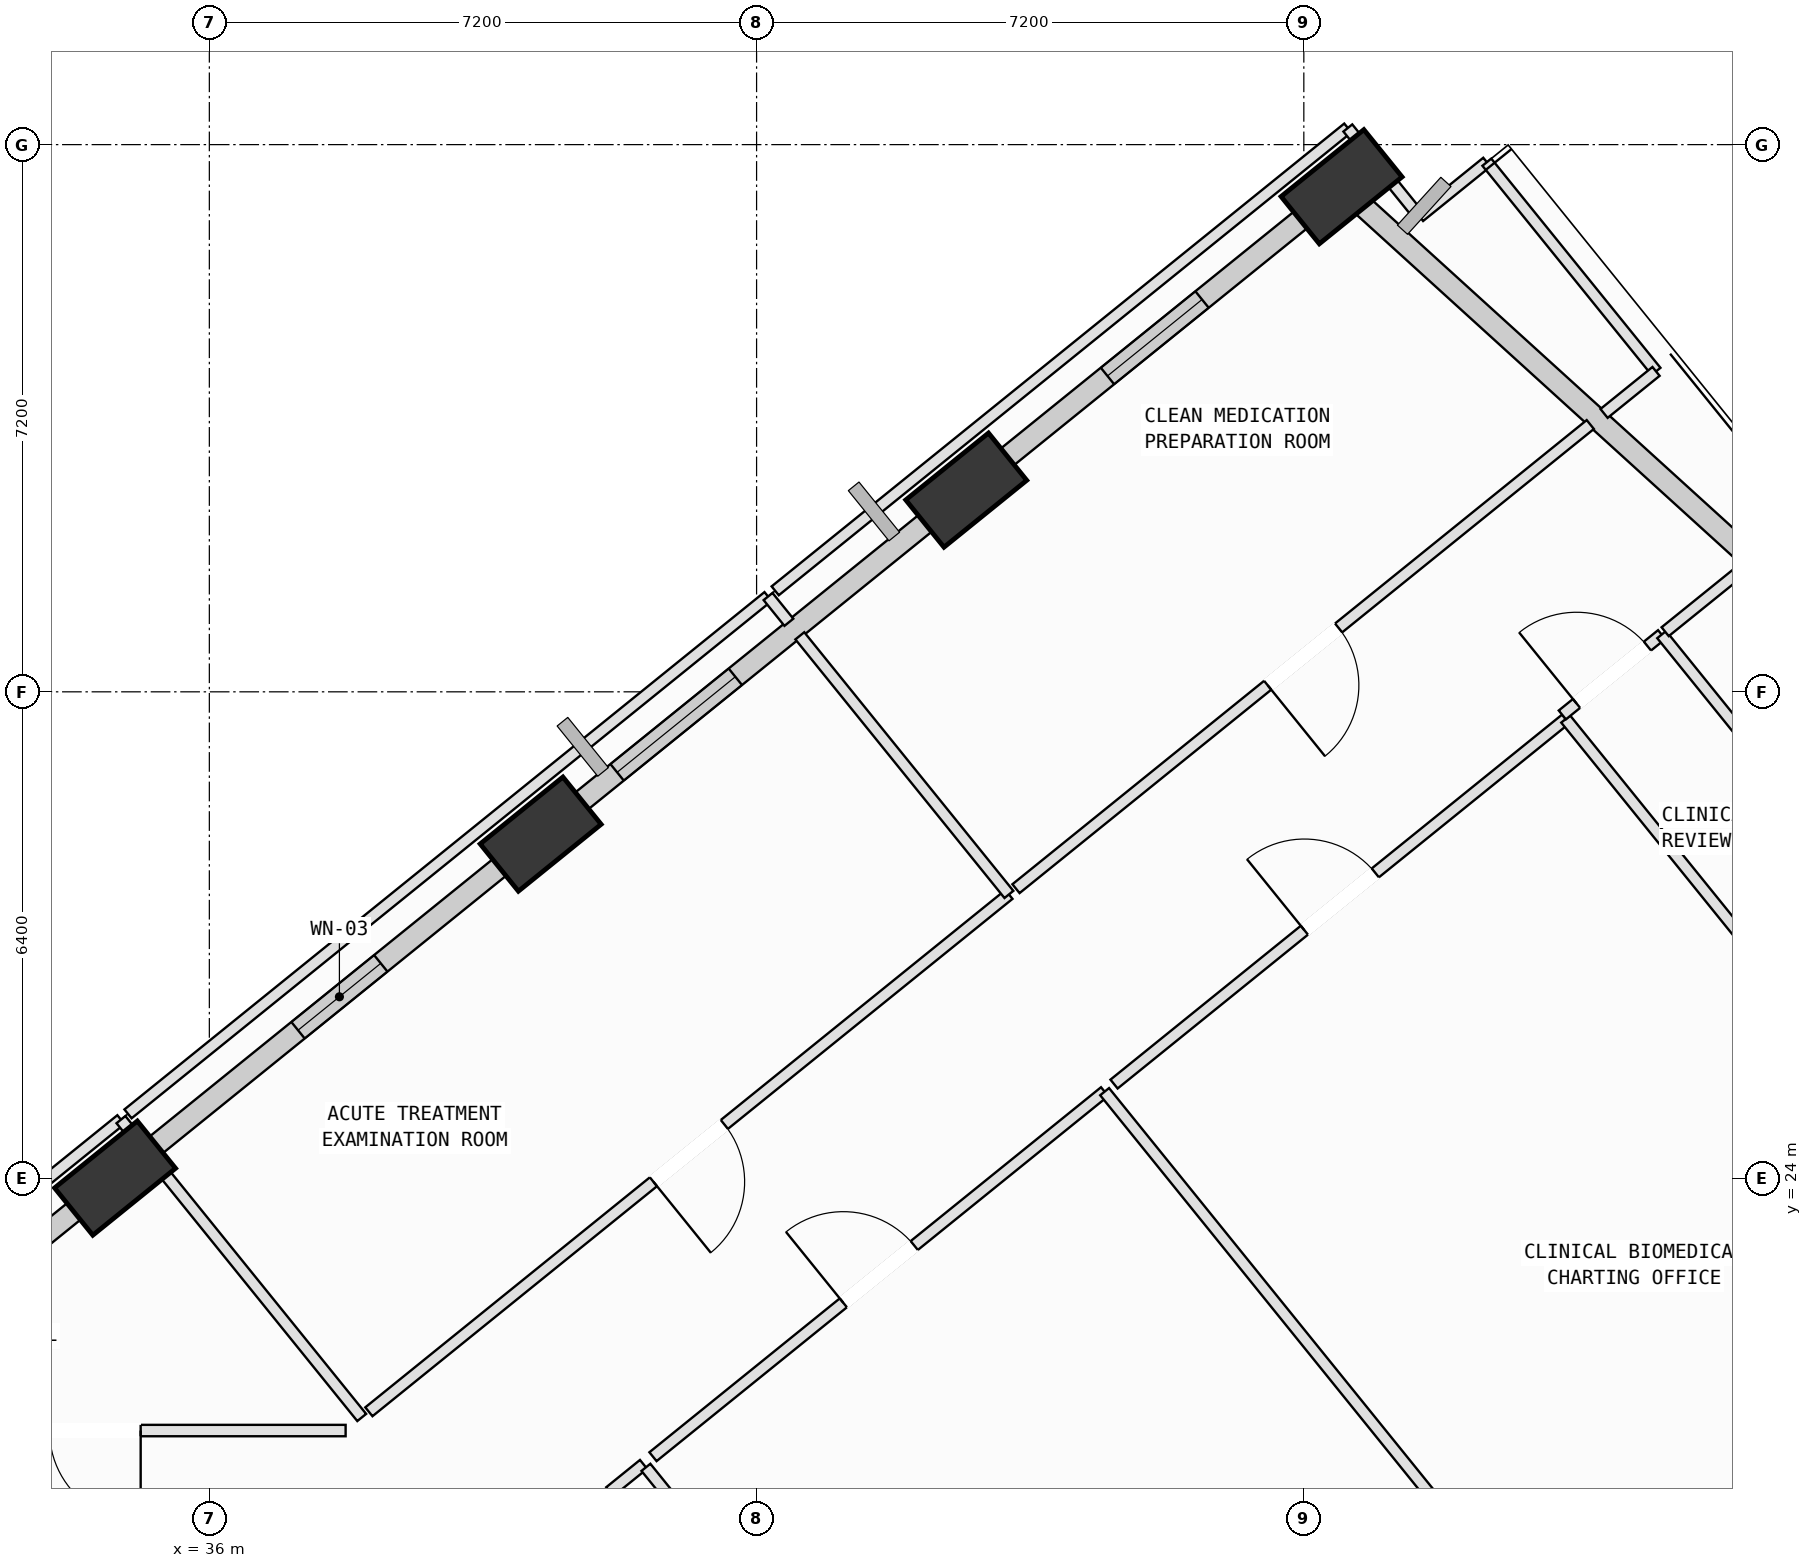
"""IFC4 building model, lengths in metres.
Left out: names, types, materials, properties, quantities, classifications, styles, units other than length and angle.
Written with IfcOpenShell. Run it as: python <this file> out.ifc"""

import sys

from ifc_helpers import new_model, si_unit, direction, frame, frame_2d, origin, origin_2d, place, context, subcontext, project, spatial, rectangle, extrude, element, fill, save


model = new_model("IFC4")
c1 = context("Model", 3, precision=1e-05, world=origin(), true_north=direction((0.0, 1.0)))
c2 = subcontext(c1, "Body", "Model", "MODEL_VIEW")
j1 = project(units=[si_unit("LENGTHUNIT", "METRE"), si_unit("PLANEANGLEUNIT", "RADIAN")], contexts=[c1])
p1 = place(None, origin())
s1 = spatial("IfcSite", under=j1, at=p1, CompositionType="ELEMENT")
p2 = place(p1, origin())
s2 = spatial("IfcBuilding", under=s1, at=p2, CompositionType="ELEMENT")
p3 = place(p2, frame((0.0, 0.0, 189.8)))
s3 = spatial("IfcBuildingStorey", under=s2, at=p3, CompositionType="ELEMENT", Elevation=189.8)
p4 = place(p3, frame((50.897, 37.046, 0.002), z_axis=(-0.051119669186, 0.071019826119, 0.996164124891), x_axis=(-0.265346985854, -0.96258245747, 0.055008996258)))
e1 = element("IfcColumn", 1, at=p4, inside=s3, PredefinedType="COLUMN", context=c2, shape_type="SweptSolid", body=[
    extrude(rectangle(XDim=1.4, YDim=0.8, at=origin_2d()), origin(), (0.0, 0.0, 1.0), 4.012),
])
p5 = place(p3, frame((45.958, 33.054, 0.002), z_axis=(-0.034573200361, 0.050792726456, 0.998110611483), x_axis=(-0.289833245681, -0.956297423836, 0.038625469103)))
e2 = element("IfcColumn", 2, at=p5, inside=s3, PredefinedType="COLUMN", context=c2, shape_type="SweptSolid", body=[
    extrude(rectangle(XDim=1.4, YDim=0.8, at=origin_2d()), origin(), (0.0, 0.0, 1.0), 4.004),
])
p6 = place(p3, frame((40.359, 28.528, 0.002), z_axis=(-0.015692361565, 0.02790431609, 0.999487418096), x_axis=(-0.369875503561, -0.928863327124, 0.02012539166)))
e3 = element("IfcColumn", 3, at=p6, inside=s3, PredefinedType="COLUMN", context=c2, shape_type="SweptSolid", body=[
    extrude(rectangle(XDim=1.4, YDim=0.8, at=origin_2d()), origin(), (0.0, 0.0, 1.0), 3.998),
])
p7 = place(p3, frame((34.76, 24.001, 0.002), z_axis=(0.003237771962, 0.004887202961, 0.999982815892), x_axis=(-0.995513971881, -0.094542846934, 0.003685360637)))
e4 = element("IfcColumn", 4, at=p7, inside=s3, PredefinedType="COLUMN", context=c2, shape_type="SweptSolid", body=[
    extrude(rectangle(XDim=1.4, YDim=0.8, at=origin_2d()), origin(), (0.0, 0.0, 1.0), 3.996),
])
p8 = place(p3, frame((51.136, 36.829, 0.0), z_axis=(0.0, 0.0, 1.0), x_axis=(0.740111301714, -0.672484394671, 0.0)))
e5 = element("IfcWall", 5, at=p8, inside=s3, PredefinedType="SOLIDWALL", context=c2, shape_type="SweptSolid", body=[
    extrude(rectangle(XDim=8.838, YDim=0.28, at=frame_2d((4.419, 0.0))), origin(), (0.0, 0.0, 1.0), 3.265),
])
p9 = place(p3, frame((46.34, 33.363, 0.0), z_axis=(0.0, 0.0, 1.0), x_axis=(0.777703327774, 0.628631477074, 0.0)))
e6 = element("IfcWall", 6, at=p9, inside=s3, PredefinedType="SOLIDWALL", context=c2, shape_type="SweptSolid", body=[
    extrude(rectangle(XDim=5.405, YDim=0.28, at=frame_2d((2.702, 0.0))), origin(), (0.0, 0.0, 1.0), 3.265),
])
p10 = place(p9, frame((1.898, 0.0, 0.75)))
e7 = element("IfcOpeningElement", 7, at=p10, cuts=e6, PredefinedType="OPENING", context=c2, shape_type="SweptSolid", body=[
    extrude(rectangle(XDim=1.6, YDim=1.95, at=frame_2d((0.8, 0.975))), frame((0.0, 0.15, 0.0), z_axis=(0.0, -1.0, 0.0), x_axis=(1.0, 0.0, 0.0)), (0.0, 0.0, 1.0), 0.3),
])
p11 = place(p3, frame((40.75, 28.844, 0.0), z_axis=(0.0, 0.0, 1.0), x_axis=(0.777687534284, 0.628651015286, 0.0)))
e8 = element("IfcWall", 8, at=p11, inside=s3, PredefinedType="SOLIDWALL", context=c2, shape_type="SweptSolid", body=[
    extrude(rectangle(XDim=6.227, YDim=0.28, at=frame_2d((3.113, 0.0))), origin(), (0.0, 0.0, 1.0), 3.065),
])
p12 = place(p11, frame((0.791, 0.0, 0.75)))
e9 = element("IfcOpeningElement", 9, at=p12, cuts=e8, PredefinedType="OPENING", context=c2, shape_type="SweptSolid", body=[
    extrude(rectangle(XDim=2.0, YDim=1.95, at=frame_2d((1.0, 0.975))), frame((0.0, 0.15, 0.0), z_axis=(0.0, -1.0, 0.0), x_axis=(1.0, 0.0, 0.0)), (0.0, 0.0, 1.0), 0.3),
])
p13 = place(p3, frame((35.154, 24.321, 0.0), z_axis=(0.0, 0.0, 1.0), x_axis=(0.7776950364, 0.628641734503, 0.0)))
e10 = element("IfcWall", 10, at=p13, inside=s3, PredefinedType="SOLIDWALL", context=c2, shape_type="SweptSolid", body=[
    extrude(rectangle(XDim=6.211, YDim=0.28, at=frame_2d((3.105, 0.0))), origin(), (0.0, 0.0, 1.0), 3.265),
])
p14 = place(p13, frame((2.588, 0.0, 0.75)))
e11 = element("IfcOpeningElement", 11, at=p14, cuts=e10, PredefinedType="OPENING", context=c2, shape_type="SweptSolid", body=[
    extrude(rectangle(XDim=1.4, YDim=1.85, at=frame_2d((0.7, 0.925))), frame((0.0, 0.15, 0.0), z_axis=(0.0, -1.0, 0.0), x_axis=(1.0, 0.0, 0.0)), (0.0, 0.0, 1.0), 0.3),
])
p15 = place(p3, frame((29.747, 19.95, 0.0), z_axis=(0.0, 0.0, 1.0), x_axis=(0.777717798176, 0.628613574782, 0.0)))
e12 = element("IfcWall", 12, at=p15, inside=s3, PredefinedType="SOLIDWALL", context=c2, shape_type="SweptSolid", body=[
    extrude(rectangle(XDim=5.96, YDim=0.28, at=frame_2d((2.98, 0.0))), origin(), (0.0, 0.0, 1.0), 3.265),
])
p16 = place(p3, frame((41.269, 19.876, 0.0), z_axis=(0.0, 0.0, 1.0), x_axis=(0.777394219276, 0.629013694475, 0.0)))
e13 = element("IfcWall", 13, at=p16, inside=s3, PredefinedType="PARTITIONING", context=c2, shape_type="SweptSolid", body=[
    extrude(rectangle(XDim=0.571, YDim=0.15, at=frame_2d((0.286, 0.0))), origin(), (0.0, 0.0, 1.0), 3.065),
])
p17 = place(p3, frame((41.744, 20.196, 0.0), z_axis=(0.0, 0.0, 1.0), x_axis=(0.628664865479, -0.777676338146, 0.0)))
e14 = element("IfcWall", 14, at=p17, inside=s3, PredefinedType="PARTITIONING", context=c2, shape_type="SweptSolid", body=[
    extrude(rectangle(XDim=13.435, YDim=0.15, at=frame_2d((6.717, 0.0))), origin(), (0.0, 0.0, 1.0), 3.78),
])
p18 = place(p3, frame((41.837, 20.336, 0.0), z_axis=(0.0, 0.0, 1.0), x_axis=(0.777713450533, 0.628618953628, 0.0)))
e15 = element("IfcWall", 15, at=p18, inside=s3, PredefinedType="PARTITIONING", context=c2, shape_type="SweptSolid", body=[
    extrude(rectangle(XDim=7.641, YDim=0.15, at=frame_2d((3.82, 0.0))), origin(), (0.0, 0.0, 1.0), 3.065),
])
p19 = place(p18, frame((3.22, 0.0, 0.0)))
e16 = element("IfcOpeningElement", 16, at=p19, cuts=e15, PredefinedType="OPENING", context=c2, shape_type="SweptSolid", body=[
    extrude(rectangle(XDim=1.2, YDim=2.15, at=frame_2d((0.6, 1.075))), frame((0.0, 0.085, 0.0), z_axis=(0.0, -1.0, 0.0), x_axis=(1.0, 0.0, 0.0)), (0.0, 0.0, 1.0), 0.17),
])
p20 = place(p3, frame((47.779, 25.139, 0.0), z_axis=(0.0, 0.0, 1.0), x_axis=(0.628603815075, -0.777725686649, 0.0)))
e17 = element("IfcWall", 17, at=p20, inside=s3, PredefinedType="PARTITIONING", context=c2, shape_type="SweptSolid", body=[
    extrude(rectangle(XDim=13.486, YDim=0.15, at=frame_2d((6.743, 0.0))), origin(), (0.0, 0.0, 1.0), 3.78),
])
p21 = place(p3, frame((47.903, 25.239, 0.0), z_axis=(0.0, 0.0, 1.0), x_axis=(0.777700823306, 0.628634575433, 0.0)))
e18 = element("IfcWall", 18, at=p21, inside=s3, PredefinedType="PARTITIONING", context=c2, shape_type="SweptSolid", body=[
    extrude(rectangle(XDim=7.64, YDim=0.15, at=frame_2d((3.82, 0.0))), origin(), (0.0, 0.0, 1.0), 3.78),
])
p22 = place(p21, frame((3.22, 0.0, 0.0)))
e19 = element("IfcOpeningElement", 19, at=p22, cuts=e18, PredefinedType="OPENING", context=c2, shape_type="SweptSolid", body=[
    extrude(rectangle(XDim=1.2, YDim=2.15, at=frame_2d((0.6, 1.075))), frame((0.0, 0.085, 0.0), z_axis=(0.0, -1.0, 0.0), x_axis=(1.0, 0.0, 0.0)), (0.0, 0.0, 1.0), 0.17),
])
p23 = place(p3, frame((53.845, 30.042, 0.0), z_axis=(0.0, 0.0, 1.0), x_axis=(0.628663319938, -0.777677587541, 0.0)))
e20 = element("IfcWall", 20, at=p23, inside=s3, PredefinedType="PARTITIONING", context=c2, shape_type="SweptSolid", body=[
    extrude(rectangle(XDim=13.83, YDim=0.15, at=frame_2d((6.915, 0.0))), origin(), (0.0, 0.0, 1.0), 3.78),
])
p24 = place(p3, frame((29.437, 20.406, 0.0), z_axis=(0.0, 0.0, 1.0), x_axis=(0.777692568026, 0.628644788125, 0.0)))
e21 = element("IfcWall", 21, at=p24, inside=s3, PredefinedType="PARTITIONING", context=c2, shape_type="SweptSolid", body=[
    extrude(rectangle(XDim=6.944, YDim=0.15, at=frame_2d((3.472, 0.0))), origin(), (0.0, 0.0, 1.0), 3.78),
])
p25 = place(p3, frame((34.837, 24.771, 0.0), z_axis=(0.0, 0.0, 1.0), x_axis=(0.628729378475, -0.777624182136, 0.0)))
e22 = element("IfcWall", 22, at=p25, inside=s3, PredefinedType="PARTITIONING", context=c2, shape_type="SweptSolid", body=[
    extrude(rectangle(XDim=0.435, YDim=0.15, at=frame_2d((0.217, 0.0))), origin(), (0.0, 0.0, 1.0), 3.78),
])
p26 = place(p3, frame((35.255, 24.254, 0.0), z_axis=(0.0, 0.0, 1.0), x_axis=(0.628661828858, -0.777678792907, 0.0)))
e23 = element("IfcWall", 23, at=p26, inside=s3, PredefinedType="PARTITIONING", context=c2, shape_type="SweptSolid", body=[
    extrude(rectangle(XDim=4.374, YDim=0.15, at=frame_2d((2.187, 0.0))), origin(), (0.0, 0.0, 1.0), 3.78),
])
p27 = place(p3, frame((37.793, 20.68, 0.0), z_axis=(0.0, 0.0, 1.0), x_axis=(-1.0, 0.0, 0.0)))
e24 = element("IfcWall", 24, at=p27, inside=s3, PredefinedType="PARTITIONING", context=c2, shape_type="SweptSolid", body=[
    extrude(rectangle(XDim=6.593, YDim=0.15, at=frame_2d((3.296, 0.0))), origin(), (0.0, 0.0, 1.0), 3.415),
])
p28 = place(p27, frame((2.697, 0.0, 0.0)))
e25 = element("IfcOpeningElement", 25, at=p28, cuts=e24, PredefinedType="OPENING", context=c2, shape_type="SweptSolid", body=[
    extrude(rectangle(XDim=1.2, YDim=2.15, at=frame_2d((0.6, 1.075))), frame((0.0, 0.085, 0.0), z_axis=(0.0, -1.0, 0.0), x_axis=(1.0, 0.0, 0.0)), (0.0, 0.0, 1.0), 0.17),
])
p29 = place(p3, frame((46.52, 27.734, 0.0), z_axis=(0.0, 0.0, 1.0), x_axis=(-0.777697805965, -0.628638308248, 0.0)))
e26 = element("IfcWall", 26, at=p29, inside=s3, PredefinedType="PARTITIONING", context=c2, shape_type="SweptSolid", body=[
    extrude(rectangle(XDim=10.828, YDim=0.15, at=frame_2d((5.414, 0.0))), origin(), (0.0, 0.0, 1.0), 3.065),
])
p30 = place(p29, frame((4.814, 0.0, 0.0)))
e27 = element("IfcOpeningElement", 27, at=p30, cuts=e26, PredefinedType="OPENING", context=c2, shape_type="SweptSolid", body=[
    extrude(rectangle(XDim=1.2, YDim=2.15, at=frame_2d((0.6, 1.075))), frame((0.0, 0.085, 0.0), z_axis=(0.0, -1.0, 0.0), x_axis=(1.0, 0.0, 0.0)), (0.0, 0.0, 1.0), 0.17),
])
p31 = place(p3, frame((34.93, 24.847, 0.0), z_axis=(0.0, 0.0, 1.0), x_axis=(0.777695693254, 0.628640921906, 0.0)))
e28 = element("IfcWall", 28, at=p31, inside=s3, PredefinedType="PARTITIONING", context=c2, shape_type="SweptSolid", body=[
    extrude(rectangle(XDim=10.828, YDim=0.15, at=frame_2d((5.414, 0.0))), origin(), (0.0, 0.0, 1.0), 3.265),
])
p32 = place(p3, frame((43.351, 31.654, 0.0), z_axis=(0.0, 0.0, 1.0), x_axis=(0.628376214537, -0.777909591793, 0.0)))
e29 = element("IfcWall", 29, at=p32, inside=s3, PredefinedType="PARTITIONING", context=c2, shape_type="SweptSolid", body=[
    extrude(rectangle(XDim=0.436, YDim=0.15, at=frame_2d((0.218, 0.0))), origin(), (0.0, 0.0, 1.0), 3.78),
])
p33 = place(p3, frame((43.769, 31.137, 0.0), z_axis=(0.0, 0.0, 1.0), x_axis=(0.62866041467, -0.777679936109, 0.0)))
e30 = element("IfcWall", 30, at=p33, inside=s3, PredefinedType="PARTITIONING", context=c2, shape_type="SweptSolid", body=[
    extrude(rectangle(XDim=4.376, YDim=0.15, at=frame_2d((2.188, 0.0))), origin(), (0.0, 0.0, 1.0), 3.78),
])
p34 = place(p3, frame((51.922, 36.653, 0.0), z_axis=(0.0, 0.0, 1.0), x_axis=(0.777848488331, 0.62845185114, 0.0)))
e31 = element("IfcWall", 31, at=p34, inside=s3, PredefinedType="PARTITIONING", context=c2, shape_type="SweptSolid", body=[
    extrude(rectangle(XDim=1.139, YDim=0.15, at=frame_2d((0.569, 0.0))), origin(), (0.0, 0.0, 1.0), 3.78),
])
p35 = place(p3, frame((52.808, 37.369, 0.0), z_axis=(0.0, 0.0, 1.0), x_axis=(0.628731909496, -0.777622135733, 0.0)))
e32 = element("IfcWall", 32, at=p35, inside=s3, PredefinedType="PARTITIONING", context=c2, shape_type="SweptSolid", body=[
    extrude(rectangle(XDim=3.54, YDim=0.15, at=frame_2d((1.77, 0.0))), origin(), (0.0, 0.0, 1.0), 3.78),
])
p36 = place(p3, frame((55.034, 34.616, 0.0), z_axis=(0.0, 0.0, 1.0), x_axis=(-0.777580932049, -0.628782867223, 0.0)))
e33 = element("IfcWall", 33, at=p36, inside=s3, PredefinedType="PARTITIONING", context=c2, shape_type="SweptSolid", body=[
    extrude(rectangle(XDim=0.879, YDim=0.15, at=frame_2d((0.44, 0.0))), origin(), (0.0, 0.0, 1.0), 3.78),
])
p37 = place(p3, frame((54.169, 33.917, 0.0), z_axis=(0.0, 0.0, 1.0), x_axis=(-0.777735624906, -0.628591518995, 0.0)))
e34 = element("IfcWall", 34, at=p37, inside=s3, PredefinedType="PARTITIONING", context=c2, shape_type="SweptSolid", body=[
    extrude(rectangle(XDim=9.715, YDim=0.15, at=frame_2d((4.858, 0.0))), origin(), (0.0, 0.0, 1.0), 3.78),
])
p38 = place(p37, frame((4.258, 0.0, 0.0)))
e35 = element("IfcOpeningElement", 35, at=p38, cuts=e34, PredefinedType="OPENING", context=c2, shape_type="SweptSolid", body=[
    extrude(rectangle(XDim=1.2, YDim=2.15, at=frame_2d((0.6, 1.075))), frame((0.0, 0.085, 0.0), z_axis=(0.0, -1.0, 0.0), x_axis=(1.0, 0.0, 0.0)), (0.0, 0.0, 1.0), 0.17),
])
p39 = place(p3, frame((43.445, 31.729, 0.0), z_axis=(0.0, 0.0, 1.0), x_axis=(0.777689532668, 0.628648543129, 0.0)))
e36 = element("IfcWall", 36, at=p39, inside=s3, PredefinedType="PARTITIONING", context=c2, shape_type="SweptSolid", body=[
    extrude(rectangle(XDim=9.688, YDim=0.15, at=frame_2d((4.844, 0.0))), origin(), (0.0, 0.0, 1.0), 3.065),
])
p40 = place(p3, frame((50.979, 37.819, 0.0), z_axis=(0.0, 0.0, 1.0), x_axis=(0.628875038418, -0.777506389719, 0.0)))
e37 = element("IfcWall", 37, at=p40, inside=s3, PredefinedType="PARTITIONING", context=c2, shape_type="SweptSolid", body=[
    extrude(rectangle(XDim=1.5, YDim=0.15, at=frame_2d((0.75, 0.0))), origin(), (0.0, 0.0, 1.0), 3.265),
])
p41 = place(p3, frame((53.801, 30.096, 0.0), z_axis=(0.0, 0.0, 1.0), x_axis=(0.7774849622, 0.628901529297, 0.0)))
e38 = element("IfcWall", 38, at=p41, inside=s3, PredefinedType="PARTITIONING", context=c2, shape_type="SweptSolid", body=[
    extrude(rectangle(XDim=1.681, YDim=0.15, at=frame_2d((0.84, 0.0))), origin(), (0.0, 0.0, 1.0), 3.78),
])
p42 = place(p41, frame((0.24, 0.0, 0.0)))
e39 = element("IfcOpeningElement", 39, at=p42, cuts=e38, PredefinedType="OPENING", context=c2, shape_type="SweptSolid", body=[
    extrude(rectangle(XDim=1.2, YDim=2.15, at=frame_2d((0.6, 1.075))), frame((0.0, 0.085, 0.0), z_axis=(0.0, -1.0, 0.0), x_axis=(1.0, 0.0, 0.0)), (0.0, 0.0, 1.0), 0.17),
])
p43 = place(p3, frame((55.108, 31.153, 0.0), z_axis=(0.0, 0.0, 1.0), x_axis=(0.628641365164, -0.777695334951, 0.0)))
e40 = element("IfcWall", 40, at=p43, inside=s3, PredefinedType="PARTITIONING", context=c2, shape_type="SweptSolid", body=[
    extrude(rectangle(XDim=11.821, YDim=0.15, at=frame_2d((5.911, 0.0))), origin(), (0.0, 0.0, 1.0), 3.78),
])
p44 = place(p43, frame((5.48, 0.0, 0.0)))
e41 = element("IfcOpeningElement", 41, at=p44, cuts=e40, PredefinedType="OPENING", context=c2, shape_type="SweptSolid", body=[
    extrude(rectangle(XDim=0.86, YDim=2.06, at=frame_2d((0.43, 1.03))), frame((0.0, 0.085, 0.0), z_axis=(0.0, -1.0, 0.0), x_axis=(1.0, 0.0, 0.0)), (0.0, 0.0, 1.0), 0.17),
])
p45 = place(p3, frame((55.154, 31.191, 0.0), z_axis=(0.0, 0.0, 1.0), x_axis=(0.777820699298, 0.628486244673, 0.0)))
e42 = element("IfcWall", 42, at=p45, inside=s3, PredefinedType="PARTITIONING", context=c2, shape_type="SweptSolid", body=[
    extrude(rectangle(XDim=1.372, YDim=0.15, at=frame_2d((0.686, 0.0))), origin(), (0.0, 0.0, 1.0), 3.78),
])
p46 = place(p10, origin())
e43 = element("IfcWindow", 43, at=p46, inside=s3, PartitioningType="SINGLE_PANEL", PredefinedType="WINDOW", context=c2, shape_type="SweptSolid", body=[
    extrude(rectangle(XDim=1.6, YDim=1.95, at=frame_2d((0.8, 0.975))), frame((0.0, 0.03, 0.0), z_axis=(0.0, -1.0, 0.0), x_axis=(1.0, 0.0, 0.0)), (0.0, 0.0, 1.0), 0.06),
])
fill(e7, e43)
p47 = place(p12, origin())
e44 = element("IfcWindow", 44, at=p47, inside=s3, PartitioningType="SINGLE_PANEL", PredefinedType="WINDOW", context=c2, shape_type="SweptSolid", body=[
    extrude(rectangle(XDim=2.0, YDim=1.95, at=frame_2d((1.0, 0.975))), frame((0.0, 0.03, 0.0), z_axis=(0.0, -1.0, 0.0), x_axis=(1.0, 0.0, 0.0)), (0.0, 0.0, 1.0), 0.06),
])
fill(e9, e44)
p48 = place(p14, origin())
e45 = element("IfcWindow", 45, at=p48, inside=s3, PartitioningType="SINGLE_PANEL", PredefinedType="WINDOW", context=c2, shape_type="SweptSolid", body=[
    extrude(rectangle(XDim=1.4, YDim=1.85, at=frame_2d((0.7, 0.925))), frame((0.0, 0.03, 0.0), z_axis=(0.0, -1.0, 0.0), x_axis=(1.0, 0.0, 0.0)), (0.0, 0.0, 1.0), 0.06),
])
fill(e11, e45)
p49 = place(p19, origin())
e46 = element("IfcDoor", 46, at=p49, inside=s3, OperationType="SINGLE_SWING_LEFT", PredefinedType="DOOR", context=c2, shape_type="SweptSolid", body=[
    extrude(rectangle(XDim=1.2, YDim=2.15, at=frame_2d((0.6, 1.075))), frame((0.0, 0.025, 0.0), z_axis=(0.0, -1.0, 0.0), x_axis=(1.0, 0.0, 0.0)), (0.0, 0.0, 1.0), 0.05),
])
fill(e16, e46)
p50 = place(p22, origin())
e47 = element("IfcDoor", 47, at=p50, inside=s3, OperationType="SINGLE_SWING_LEFT", PredefinedType="DOOR", context=c2, shape_type="SweptSolid", body=[
    extrude(rectangle(XDim=1.2, YDim=2.15, at=frame_2d((0.6, 1.075))), frame((0.0, 0.025, 0.0), z_axis=(0.0, -1.0, 0.0), x_axis=(1.0, 0.0, 0.0)), (0.0, 0.0, 1.0), 0.05),
])
fill(e19, e47)
p51 = place(p28, origin())
e48 = element("IfcDoor", 48, at=p51, inside=s3, OperationType="SINGLE_SWING_LEFT", PredefinedType="DOOR", context=c2, shape_type="SweptSolid", body=[
    extrude(rectangle(XDim=1.2, YDim=2.15, at=frame_2d((0.6, 1.075))), frame((0.0, 0.025, 0.0), z_axis=(0.0, -1.0, 0.0), x_axis=(1.0, 0.0, 0.0)), (0.0, 0.0, 1.0), 0.05),
])
fill(e25, e48)
p52 = place(p30, origin())
e49 = element("IfcDoor", 49, at=p52, inside=s3, OperationType="SINGLE_SWING_RIGHT", PredefinedType="DOOR", context=c2, shape_type="SweptSolid", body=[
    extrude(rectangle(XDim=1.2, YDim=2.15, at=frame_2d((0.6, 1.075))), frame((0.0, 0.025, 0.0), z_axis=(0.0, -1.0, 0.0), x_axis=(1.0, 0.0, 0.0)), (0.0, 0.0, 1.0), 0.05),
])
fill(e27, e49)
p53 = place(p38, origin())
e50 = element("IfcDoor", 50, at=p53, inside=s3, OperationType="SINGLE_SWING_RIGHT", PredefinedType="DOOR", context=c2, shape_type="SweptSolid", body=[
    extrude(rectangle(XDim=1.2, YDim=2.15, at=frame_2d((0.6, 1.075))), frame((0.0, 0.025, 0.0), z_axis=(0.0, -1.0, 0.0), x_axis=(1.0, 0.0, 0.0)), (0.0, 0.0, 1.0), 0.05),
])
fill(e35, e50)
p54 = place(p42, origin())
e51 = element("IfcDoor", 51, at=p54, inside=s3, OperationType="SINGLE_SWING_LEFT", PredefinedType="DOOR", context=c2, shape_type="SweptSolid", body=[
    extrude(rectangle(XDim=1.2, YDim=2.15, at=frame_2d((0.6, 1.075))), frame((0.0, 0.025, 0.0), z_axis=(0.0, -1.0, 0.0), x_axis=(1.0, 0.0, 0.0)), (0.0, 0.0, 1.0), 0.05),
])
fill(e39, e51)
save(model, sys.argv[1])
